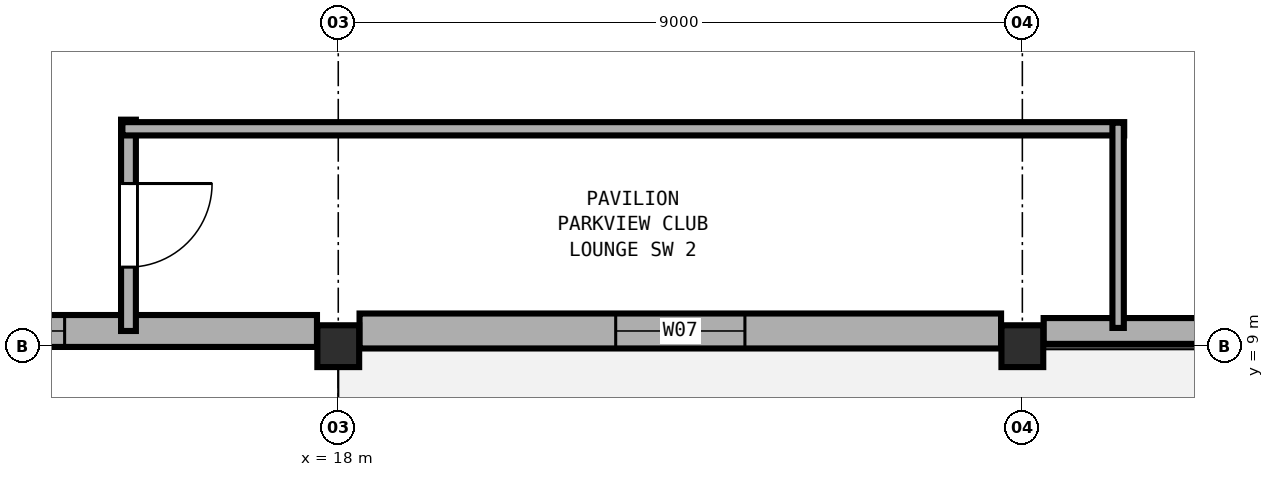
"""IFC4 building model, lengths in metres.
Left out: names, types, materials, properties, quantities, classifications, styles, units other than length and angle.
Written with IfcOpenShell. Run it as: python <this file> out.ifc"""

import sys

from ifc_helpers import new_model, si_unit, direction, frame, frame_2d, origin, origin_2d, place, context, subcontext, project, spatial, rectangle, extrude, element, fill, save


model = new_model("IFC4")
c1 = context("Model", 3, precision=1e-05, world=origin(), true_north=direction((0.0, 1.0)))
c2 = subcontext(c1, "Body", "Model", "MODEL_VIEW")
j1 = project(units=[si_unit("LENGTHUNIT", "METRE"), si_unit("PLANEANGLEUNIT", "RADIAN")], contexts=[c1])
p1 = place(None, origin())
s1 = spatial("IfcSite", under=j1, at=p1, CompositionType="ELEMENT")
p2 = place(p1, origin())
s2 = spatial("IfcBuilding", under=s1, at=p2, CompositionType="ELEMENT")
p3 = place(p2, frame((0.0, 0.0, 9.6)))
s3 = spatial("IfcBuildingStorey", under=s2, at=p3, CompositionType="ELEMENT", Elevation=9.6)
for number, where, z_axis, x_axis in (
    (1, (18.0, 9.0, 0.0), (0.0, 0.0, 1.0), (1.0, 0.0, 0.0)),
    (2, (27.0, 9.0, 0.0), (0.0, 0.0, 1.0), (1.0, 0.0, 0.0)),
):
    element("IfcColumn", number, at=place(p3, frame(where, z_axis=z_axis, x_axis=x_axis)), inside=s3, PredefinedType="COLUMN", context=c2, shape_type="SweptSolid", body=[
        extrude(rectangle(XDim=0.55, YDim=0.55, at=origin_2d()), origin(), (0.0, 0.0, 1.0), 4.8),
    ])
p4 = place(p3, frame((35.72, 9.2, 0.0), z_axis=(0.0, 0.0, 1.0), x_axis=(-1.0, 0.0, 0.0)))
e3 = element("IfcWall", 3, at=p4, inside=s3, PredefinedType="SOLIDWALL", context=c2, shape_type="SweptSolid", body=[
    extrude(rectangle(XDim=8.44, YDim=0.34, at=frame_2d((4.22, 0.0))), origin(), (0.0, 0.0, 1.0), 3.58),
])
p5 = place(p4, frame((3.42, 0.0, 0.9)))
e4 = element("IfcOpeningElement", 4, at=p5, cuts=e3, PredefinedType="OPENING", context=c2, shape_type="SweptSolid", body=[
    extrude(rectangle(XDim=1.6, YDim=1.65, at=frame_2d((0.8, 0.825))), frame((0.0, 0.18, 0.0), z_axis=(0.0, -1.0, 0.0), x_axis=(1.0, 0.0, 0.0)), (0.0, 0.0, 1.0), 0.36),
])
p6 = place(p3, frame((26.72, 9.2, 0.0), z_axis=(0.0, 0.0, 1.0), x_axis=(-1.0, 0.0, 0.0)))
e5 = element("IfcWall", 5, at=p6, inside=s3, PredefinedType="SOLIDWALL", context=c2, shape_type="SweptSolid", body=[
    extrude(rectangle(XDim=8.44, YDim=0.46, at=frame_2d((4.22, 0.0))), origin(), (0.0, 0.0, 1.0), 3.58),
])
p7 = place(p6, frame((3.37, 0.0, 0.9)))
e6 = element("IfcOpeningElement", 6, at=p7, cuts=e5, PredefinedType="OPENING", context=c2, shape_type="SweptSolid", body=[
    extrude(rectangle(XDim=1.7, YDim=1.7, at=frame_2d((0.85, 0.85))), frame((0.0, 0.24, 0.0), z_axis=(0.0, -1.0, 0.0), x_axis=(1.0, 0.0, 0.0)), (0.0, 0.0, 1.0), 0.48),
])
p8 = place(p3, frame((17.72, 9.2, 0.0), z_axis=(0.0, 0.0, 1.0), x_axis=(-1.0, 0.0, 0.0)))
e7 = element("IfcWall", 7, at=p8, inside=s3, PredefinedType="SOLIDWALL", context=c2, shape_type="SweptSolid", body=[
    extrude(rectangle(XDim=8.44, YDim=0.42, at=frame_2d((4.22, 0.0))), origin(), (0.0, 0.0, 1.0), 3.58),
])
p9 = place(p8, frame((3.32, 0.0, 0.9)))
e8 = element("IfcOpeningElement", 8, at=p9, cuts=e7, PredefinedType="OPENING", context=c2, shape_type="SweptSolid", body=[
    extrude(rectangle(XDim=1.8, YDim=1.75, at=frame_2d((0.9, 0.875))), frame((0.0, 0.22, 0.0), z_axis=(0.0, -1.0, 0.0), x_axis=(1.0, 0.0, 0.0)), (0.0, 0.0, 1.0), 0.44),
])
p10 = place(p3, frame((15.24, 11.98, 0.0), z_axis=(0.0, 0.0, 1.0), x_axis=(0.0, -1.0, 0.0)))
e9 = element("IfcWall", 9, at=p10, inside=s3, PredefinedType="PARTITIONING", context=c2, shape_type="SweptSolid", body=[
    extrude(rectangle(XDim=2.78, YDim=0.195, at=frame_2d((1.39, 0.0))), origin(), (0.0, 0.0, 1.0), 3.56),
])
p11 = place(p10, frame((0.84, 0.0, 0.0)))
e10 = element("IfcOpeningElement", 10, at=p11, cuts=e9, PredefinedType="OPENING", context=c2, shape_type="SweptSolid", body=[
    extrude(rectangle(XDim=1.1, YDim=2.1, at=frame_2d((0.55, 1.05))), frame((0.0, 0.107, 0.0), z_axis=(0.0, -1.0, 0.0), x_axis=(1.0, 0.0, 0.0)), (0.0, 0.0, 1.0), 0.215),
])
p12 = place(p3, frame((15.16, 11.86, 0.0), z_axis=(0.0, 0.0, 1.0), x_axis=(1.0, 0.0, 0.0)))
e11 = element("IfcWall", 11, at=p12, inside=s3, PredefinedType="PARTITIONING", context=c2, shape_type="SweptSolid", body=[
    extrude(rectangle(XDim=13.18, YDim=0.175, at=frame_2d((6.59, 0.0))), origin(), (0.0, 0.0, 1.0), 3.56),
])
p13 = place(p3, frame((28.26, 11.94, 0.0), z_axis=(0.0, 0.0, 1.0), x_axis=(0.0, -1.0, 0.0)))
e12 = element("IfcWall", 12, at=p13, inside=s3, PredefinedType="PARTITIONING", context=c2, shape_type="SweptSolid", body=[
    extrude(rectangle(XDim=2.7, YDim=0.15, at=frame_2d((1.35, 0.0))), origin(), (0.0, 0.0, 1.0), 3.56),
])
p14 = place(p7, origin())
e13 = element("IfcWindow", 13, at=p14, inside=s3, PartitioningType="SINGLE_PANEL", PredefinedType="WINDOW", context=c2, shape_type="SweptSolid", body=[
    extrude(rectangle(XDim=1.7, YDim=1.7, at=frame_2d((0.85, 0.85))), frame((0.0, 0.03, 0.0), z_axis=(0.0, -1.0, 0.0), x_axis=(1.0, 0.0, 0.0)), (0.0, 0.0, 1.0), 0.06),
])
fill(e6, e13)
p15 = place(p9, origin())
e14 = element("IfcWindow", 14, at=p15, inside=s3, PartitioningType="DOUBLE_PANEL_VERTICAL", PredefinedType="WINDOW", context=c2, shape_type="SweptSolid", body=[
    extrude(rectangle(XDim=1.8, YDim=1.75, at=frame_2d((0.9, 0.875))), frame((0.0, 0.03, 0.0), z_axis=(0.0, -1.0, 0.0), x_axis=(1.0, 0.0, 0.0)), (0.0, 0.0, 1.0), 0.06),
])
fill(e8, e14)
p16 = place(p11, origin())
e15 = element("IfcDoor", 15, at=p16, inside=s3, OperationType="SINGLE_SWING_LEFT", PredefinedType="DOOR", context=c2, shape_type="SweptSolid", body=[
    extrude(rectangle(XDim=1.1, YDim=2.1, at=frame_2d((0.55, 1.05))), frame((0.0, 0.025, 0.0), z_axis=(0.0, -1.0, 0.0), x_axis=(1.0, 0.0, 0.0)), (0.0, 0.0, 1.0), 0.05),
])
fill(e10, e15)
save(model, sys.argv[1])
